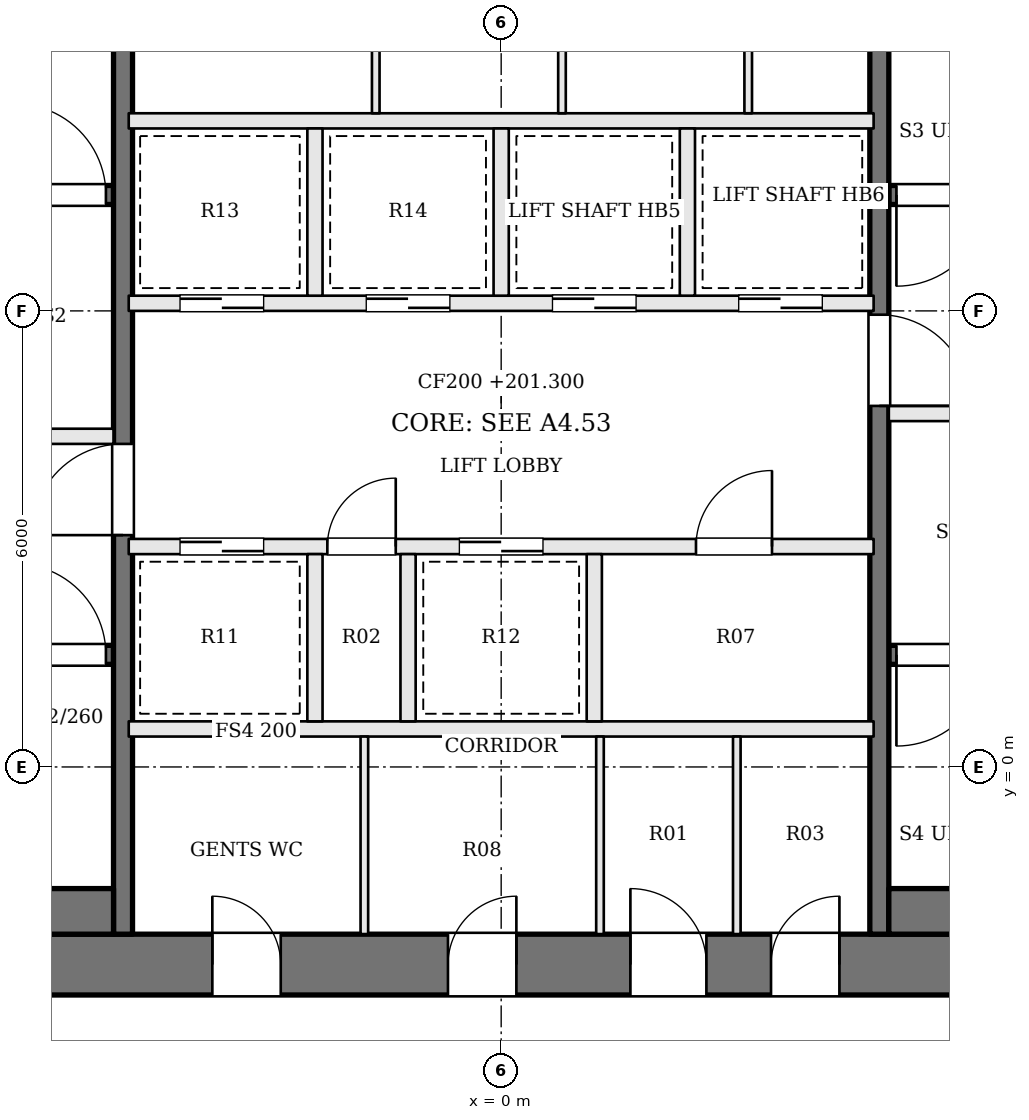
"""IFC4 building model, lengths in metres.
Left out: names, types, materials, properties, quantities, classifications, styles, units other than length and angle.
Written with IfcOpenShell. Run it as: python <this file> out.ifc"""

import sys

from ifc_helpers import new_model, si_unit, direction, frame, frame_2d, origin, place, context, subcontext, project, spatial, rectangle, extrude, element, fill, save


model = new_model("IFC4")
c1 = context("Model", 3, precision=1e-05, world=origin(), true_north=direction((0.0, 1.0)))
c2 = subcontext(c1, "Body", "Model", "MODEL_VIEW")
j1 = project(units=[si_unit("LENGTHUNIT", "METRE"), si_unit("PLANEANGLEUNIT", "RADIAN")], contexts=[c1])
p1 = place(None, origin())
s1 = spatial("IfcSite", under=j1, at=p1, CompositionType="ELEMENT")
p2 = place(p1, origin())
s2 = spatial("IfcBuilding", under=s1, at=p2, CompositionType="ELEMENT")
p3 = place(p2, frame((0.0, 0.0, 201.3)))
s3 = spatial("IfcBuildingStorey", under=s2, at=p3, CompositionType="ELEMENT", Elevation=201.3)
p4 = place(p3, frame((-13.0, -2.6, 0.0), z_axis=(0.0, 0.0, 1.0), x_axis=(1.0, 0.0, 0.0)))
e1 = element("IfcWall", 1, at=p4, inside=s3, PredefinedType="SHEAR", context=c2, shape_type="SweptSolid", body=[
    extrude(rectangle(XDim=26.0, YDim=0.8, at=frame_2d((13.0, 0.0))), origin(), (0.0, 0.0, 1.0), 3.9),
])
p5 = place(p4, frame((9.2, 0.0, 0.0)))
e2 = element("IfcOpeningElement", 2, at=p5, cuts=e1, PredefinedType="OPENING", context=c2, shape_type="SweptSolid", body=[
    extrude(rectangle(XDim=0.9, YDim=2.1, at=frame_2d((0.45, 1.05))), frame((0.0, 0.41, 0.0), z_axis=(0.0, -1.0, 0.0), x_axis=(1.0, 0.0, 0.0)), (0.0, 0.0, 1.0), 0.82),
])
p6 = place(p4, frame((12.3, 0.0, 0.0)))
e3 = element("IfcOpeningElement", 3, at=p6, cuts=e1, PredefinedType="OPENING", context=c2, shape_type="SweptSolid", body=[
    extrude(rectangle(XDim=0.9, YDim=2.1, at=frame_2d((0.45, 1.05))), frame((0.0, 0.41, 0.0), z_axis=(0.0, -1.0, 0.0), x_axis=(1.0, 0.0, 0.0)), (0.0, 0.0, 1.0), 0.82),
])
p7 = place(p4, frame((14.7, 0.0, 0.0)))
e4 = element("IfcOpeningElement", 4, at=p7, cuts=e1, PredefinedType="OPENING", context=c2, shape_type="SweptSolid", body=[
    extrude(rectangle(XDim=1.0, YDim=2.1, at=frame_2d((0.5, 1.05))), frame((0.0, 0.41, 0.0), z_axis=(0.0, -1.0, 0.0), x_axis=(1.0, 0.0, 0.0)), (0.0, 0.0, 1.0), 0.82),
])
p8 = place(p4, frame((16.55, 0.0, 0.0)))
e5 = element("IfcOpeningElement", 5, at=p8, cuts=e1, PredefinedType="OPENING", context=c2, shape_type="SweptSolid", body=[
    extrude(rectangle(XDim=0.9, YDim=2.1, at=frame_2d((0.45, 1.05))), frame((0.0, 0.41, 0.0), z_axis=(0.0, -1.0, 0.0), x_axis=(1.0, 0.0, 0.0)), (0.0, 0.0, 1.0), 0.82),
])
p9 = place(p3, frame((-12.2, 1.475, 0.0), z_axis=(0.0, 0.0, 1.0), x_axis=(1.0, 0.0, 0.0)))
e6 = element("IfcWall", 6, at=p9, inside=s3, PredefinedType="SOLIDWALL", context=c2, shape_type="SweptSolid", body=[
    extrude(rectangle(XDim=7.1, YDim=0.25, at=frame_2d((3.55, 0.0))), origin(), (0.0, 0.0, 1.0), 3.7),
])
p10 = place(p9, frame((5.8, 0.0, 0.0)))
e7 = element("IfcOpeningElement", 7, at=p10, cuts=e6, PredefinedType="OPENING", context=c2, shape_type="SweptSolid", body=[
    extrude(rectangle(XDim=1.2, YDim=2.1, at=frame_2d((0.6, 1.05))), frame((0.0, 0.135, 0.0), z_axis=(0.0, -1.0, 0.0), x_axis=(1.0, 0.0, 0.0)), (0.0, 0.0, 1.0), 0.27),
])
p11 = place(p3, frame((12.2, 7.525, 0.0), z_axis=(0.0, 0.0, 1.0), x_axis=(-1.0, 0.0, 0.0)))
e8 = element("IfcWall", 8, at=p11, inside=s3, PredefinedType="SOLIDWALL", context=c2, shape_type="SweptSolid", body=[
    extrude(rectangle(XDim=7.1, YDim=0.25, at=frame_2d((3.55, 0.0))), origin(), (0.0, 0.0, 1.0), 3.7),
])
p12 = place(p11, frame((5.8, 0.0, 0.0)))
e9 = element("IfcOpeningElement", 9, at=p12, cuts=e8, PredefinedType="OPENING", context=c2, shape_type="SweptSolid", body=[
    extrude(rectangle(XDim=1.2, YDim=2.1, at=frame_2d((0.6, 1.05))), frame((0.0, 0.135, 0.0), z_axis=(0.0, -1.0, 0.0), x_axis=(1.0, 0.0, 0.0)), (0.0, 0.0, 1.0), 0.27),
])
p13 = place(p3, frame((-12.2, 4.35, 0.0), z_axis=(0.0, 0.0, 1.0), x_axis=(1.0, 0.0, 0.0)))
e10 = element("IfcWall", 10, at=p13, inside=s3, PredefinedType="SOLIDWALL", context=c2, shape_type="SweptSolid", body=[
    extrude(rectangle(XDim=7.1, YDim=0.2, at=frame_2d((3.55, 0.0))), origin(), (0.0, 0.0, 1.0), 3.7),
])
p14 = place(p13, frame((4.4, 0.0, 0.0)))
e11 = element("IfcOpeningElement", 11, at=p14, cuts=e10, PredefinedType="OPENING", context=c2, shape_type="SweptSolid", body=[
    extrude(rectangle(XDim=1.2, YDim=2.1, at=frame_2d((0.6, 1.05))), frame((0.0, 0.11, 0.0), z_axis=(0.0, -1.0, 0.0), x_axis=(1.0, 0.0, 0.0)), (0.0, 0.0, 1.0), 0.22),
])
p15 = place(p13, frame((1.1, 0.0, 0.0)))
e12 = element("IfcOpeningElement", 12, at=p15, cuts=e10, PredefinedType="OPENING", context=c2, shape_type="SweptSolid", body=[
    extrude(rectangle(XDim=1.2, YDim=2.1, at=frame_2d((0.6, 1.05))), frame((0.0, 0.11, 0.0), z_axis=(0.0, -1.0, 0.0), x_axis=(1.0, 0.0, 0.0)), (0.0, 0.0, 1.0), 0.22),
])
p16 = place(p3, frame((12.2, 4.65, 0.0), z_axis=(0.0, 0.0, 1.0), x_axis=(-1.0, 0.0, 0.0)))
e13 = element("IfcWall", 13, at=p16, inside=s3, PredefinedType="SOLIDWALL", context=c2, shape_type="SweptSolid", body=[
    extrude(rectangle(XDim=7.1, YDim=0.2, at=frame_2d((3.55, 0.0))), origin(), (0.0, 0.0, 1.0), 3.7),
])
p17 = place(p16, frame((4.4, 0.0, 0.0)))
e14 = element("IfcOpeningElement", 14, at=p17, cuts=e13, PredefinedType="OPENING", context=c2, shape_type="SweptSolid", body=[
    extrude(rectangle(XDim=1.2, YDim=2.1, at=frame_2d((0.6, 1.05))), frame((0.0, 0.11, 0.0), z_axis=(0.0, -1.0, 0.0), x_axis=(1.0, 0.0, 0.0)), (0.0, 0.0, 1.0), 0.22),
])
p18 = place(p16, frame((1.1, 0.0, 0.0)))
e15 = element("IfcOpeningElement", 15, at=p18, cuts=e13, PredefinedType="OPENING", context=c2, shape_type="SweptSolid", body=[
    extrude(rectangle(XDim=1.2, YDim=2.1, at=frame_2d((0.6, 1.05))), frame((0.0, 0.11, 0.0), z_axis=(0.0, -1.0, 0.0), x_axis=(1.0, 0.0, 0.0)), (0.0, 0.0, 1.0), 0.22),
])
p19 = place(p3, frame((-12.2, 7.525, 0.0), z_axis=(0.0, 0.0, 1.0), x_axis=(1.0, 0.0, 0.0)))
e16 = element("IfcWall", 16, at=p19, inside=s3, PredefinedType="SOLIDWALL", context=c2, shape_type="SweptSolid", body=[
    extrude(rectangle(XDim=7.1, YDim=0.25, at=frame_2d((3.55, 0.0))), origin(), (0.0, 0.0, 1.0), 3.7),
])
p20 = place(p19, frame((5.8, 0.0, 0.0)))
e17 = element("IfcOpeningElement", 17, at=p20, cuts=e16, PredefinedType="OPENING", context=c2, shape_type="SweptSolid", body=[
    extrude(rectangle(XDim=1.2, YDim=2.1, at=frame_2d((0.6, 1.05))), frame((0.0, 0.135, 0.0), z_axis=(0.0, -1.0, 0.0), x_axis=(1.0, 0.0, 0.0)), (0.0, 0.0, 1.0), 0.27),
])
p21 = place(p3, frame((12.2, 1.475, 0.0), z_axis=(0.0, 0.0, 1.0), x_axis=(-1.0, 0.0, 0.0)))
e18 = element("IfcWall", 18, at=p21, inside=s3, PredefinedType="SOLIDWALL", context=c2, shape_type="SweptSolid", body=[
    extrude(rectangle(XDim=7.1, YDim=0.25, at=frame_2d((3.55, 0.0))), origin(), (0.0, 0.0, 1.0), 3.7),
])
p22 = place(p21, frame((5.8, 0.0, 0.0)))
e19 = element("IfcOpeningElement", 19, at=p22, cuts=e18, PredefinedType="OPENING", context=c2, shape_type="SweptSolid", body=[
    extrude(rectangle(XDim=1.2, YDim=2.1, at=frame_2d((0.6, 1.05))), frame((0.0, 0.135, 0.0), z_axis=(0.0, -1.0, 0.0), x_axis=(1.0, 0.0, 0.0)), (0.0, 0.0, 1.0), 0.27),
])
p23 = place(p3, frame((-4.975, -2.2, 0.0), z_axis=(0.0, 0.0, 1.0), x_axis=(0.0, 1.0, 0.0)))
e20 = element("IfcWall", 20, at=p23, inside=s3, PredefinedType="SOLIDWALL", context=c2, shape_type="SweptSolid", body=[
    extrude(rectangle(XDim=13.4, YDim=0.25, at=frame_2d((6.7, 0.0))), origin(), (0.0, 0.0, 1.0), 3.7),
])
p24 = place(p23, frame((5.25, 0.0, 0.0)))
e21 = element("IfcOpeningElement", 21, at=p24, cuts=e20, PredefinedType="OPENING", context=c2, shape_type="SweptSolid", body=[
    extrude(rectangle(XDim=1.2, YDim=2.1, at=frame_2d((0.6, 1.05))), frame((0.0, 0.135, 0.0), z_axis=(0.0, -1.0, 0.0), x_axis=(1.0, 0.0, 0.0)), (0.0, 0.0, 1.0), 0.27),
])
p25 = place(p3, frame((4.975, 11.2, 0.0), z_axis=(0.0, 0.0, 1.0), x_axis=(0.0, -1.0, 0.0)))
e22 = element("IfcWall", 22, at=p25, inside=s3, PredefinedType="SOLIDWALL", context=c2, shape_type="SweptSolid", body=[
    extrude(rectangle(XDim=13.4, YDim=0.25, at=frame_2d((6.7, 0.0))), origin(), (0.0, 0.0, 1.0), 3.7),
])
p26 = place(p25, frame((5.25, 0.0, 0.0)))
e23 = element("IfcOpeningElement", 23, at=p26, cuts=e22, PredefinedType="OPENING", context=c2, shape_type="SweptSolid", body=[
    extrude(rectangle(XDim=1.2, YDim=2.1, at=frame_2d((0.6, 1.05))), frame((0.0, 0.135, 0.0), z_axis=(0.0, -1.0, 0.0), x_axis=(1.0, 0.0, 0.0)), (0.0, 0.0, 1.0), 0.27),
])
for number, where, z_axis, x_axis in (
    (24, (-12.2, -1.9, 0.0), (0.0, 0.0, 1.0), (1.0, 0.0, 0.0)),
    (25, (12.2, -1.9, 0.0), (0.0, 0.0, 1.0), (-1.0, 0.0, 0.0)),
):
    element("IfcWall", number, at=place(p3, frame(where, z_axis=z_axis, x_axis=x_axis)), inside=s3, PredefinedType="SOLIDWALL", context=c2, shape_type="SweptSolid", body=[
        extrude(rectangle(XDim=7.1, YDim=0.6, at=frame_2d((3.55, 0.0))), origin(), (0.0, 0.0, 1.0), 3.7),
    ])
p27 = place(p3, frame((-4.9, 0.5, 0.0), z_axis=(0.0, 0.0, 1.0), x_axis=(1.0, 0.0, 0.0)))
e26 = element("IfcWall", 26, at=p27, inside=s3, PredefinedType="SOLIDWALL", context=c2, shape_type="SweptSolid", body=[
    extrude(rectangle(XDim=9.8, YDim=0.2, at=frame_2d((4.9, 0.0))), origin(), (0.0, 0.0, 1.0), 3.7),
])
p28 = place(p3, frame((-4.9, 2.9, 0.0), z_axis=(0.0, 0.0, 1.0), x_axis=(1.0, 0.0, 0.0)))
e27 = element("IfcWall", 27, at=p28, inside=s3, PredefinedType="SOLIDWALL", context=c2, shape_type="SweptSolid", body=[
    extrude(rectangle(XDim=9.8, YDim=0.2, at=frame_2d((4.9, 0.0))), origin(), (0.0, 0.0, 1.0), 3.7),
])
p29 = place(p28, frame((0.675, 0.0, 0.0)))
e28 = element("IfcOpeningElement", 28, at=p29, cuts=e27, PredefinedType="OPENING", context=c2, shape_type="SweptSolid", body=[
    extrude(rectangle(XDim=1.1, YDim=2.1, at=frame_2d((0.55, 1.05))), frame((0.0, 0.11, 0.0), z_axis=(0.0, -1.0, 0.0), x_axis=(1.0, 0.0, 0.0)), (0.0, 0.0, 1.0), 0.22),
])
p30 = place(p28, frame((2.613, 0.0, 0.0)))
e29 = element("IfcOpeningElement", 29, at=p30, cuts=e27, PredefinedType="OPENING", context=c2, shape_type="SweptSolid", body=[
    extrude(rectangle(XDim=0.9, YDim=2.1, at=frame_2d((0.45, 1.05))), frame((0.0, 0.11, 0.0), z_axis=(0.0, -1.0, 0.0), x_axis=(1.0, 0.0, 0.0)), (0.0, 0.0, 1.0), 0.22),
])
p31 = place(p28, frame((4.35, 0.0, 0.0)))
e30 = element("IfcOpeningElement", 30, at=p31, cuts=e27, PredefinedType="OPENING", context=c2, shape_type="SweptSolid", body=[
    extrude(rectangle(XDim=1.1, YDim=2.1, at=frame_2d((0.55, 1.05))), frame((0.0, 0.11, 0.0), z_axis=(0.0, -1.0, 0.0), x_axis=(1.0, 0.0, 0.0)), (0.0, 0.0, 1.0), 0.22),
])
p32 = place(p28, frame((7.463, 0.0, 0.0)))
e31 = element("IfcOpeningElement", 31, at=p32, cuts=e27, PredefinedType="OPENING", context=c2, shape_type="SweptSolid", body=[
    extrude(rectangle(XDim=1.0, YDim=2.1, at=frame_2d((0.5, 1.05))), frame((0.0, 0.11, 0.0), z_axis=(0.0, -1.0, 0.0), x_axis=(1.0, 0.0, 0.0)), (0.0, 0.0, 1.0), 0.22),
])
p33 = place(p3, frame((-4.9, 6.1, 0.0), z_axis=(0.0, 0.0, 1.0), x_axis=(1.0, 0.0, 0.0)))
e32 = element("IfcWall", 32, at=p33, inside=s3, PredefinedType="SOLIDWALL", context=c2, shape_type="SweptSolid", body=[
    extrude(rectangle(XDim=9.8, YDim=0.2, at=frame_2d((4.9, 0.0))), origin(), (0.0, 0.0, 1.0), 3.7),
])
p34 = place(p33, frame((0.675, 0.0, 0.0)))
e33 = element("IfcOpeningElement", 33, at=p34, cuts=e32, PredefinedType="OPENING", context=c2, shape_type="SweptSolid", body=[
    extrude(rectangle(XDim=1.1, YDim=2.1, at=frame_2d((0.55, 1.05))), frame((0.0, 0.11, 0.0), z_axis=(0.0, -1.0, 0.0), x_axis=(1.0, 0.0, 0.0)), (0.0, 0.0, 1.0), 0.22),
])
p35 = place(p33, frame((3.125, 0.0, 0.0)))
e34 = element("IfcOpeningElement", 34, at=p35, cuts=e32, PredefinedType="OPENING", context=c2, shape_type="SweptSolid", body=[
    extrude(rectangle(XDim=1.1, YDim=2.1, at=frame_2d((0.55, 1.05))), frame((0.0, 0.11, 0.0), z_axis=(0.0, -1.0, 0.0), x_axis=(1.0, 0.0, 0.0)), (0.0, 0.0, 1.0), 0.22),
])
p36 = place(p33, frame((5.575, 0.0, 0.0)))
e35 = element("IfcOpeningElement", 35, at=p36, cuts=e32, PredefinedType="OPENING", context=c2, shape_type="SweptSolid", body=[
    extrude(rectangle(XDim=1.1, YDim=2.1, at=frame_2d((0.55, 1.05))), frame((0.0, 0.11, 0.0), z_axis=(0.0, -1.0, 0.0), x_axis=(1.0, 0.0, 0.0)), (0.0, 0.0, 1.0), 0.22),
])
p37 = place(p33, frame((8.025, 0.0, 0.0)))
e36 = element("IfcOpeningElement", 36, at=p37, cuts=e32, PredefinedType="OPENING", context=c2, shape_type="SweptSolid", body=[
    extrude(rectangle(XDim=1.1, YDim=2.1, at=frame_2d((0.55, 1.05))), frame((0.0, 0.11, 0.0), z_axis=(0.0, -1.0, 0.0), x_axis=(1.0, 0.0, 0.0)), (0.0, 0.0, 1.0), 0.22),
])
p38 = place(p3, frame((-4.9, 8.5, 0.0), z_axis=(0.0, 0.0, 1.0), x_axis=(1.0, 0.0, 0.0)))
e37 = element("IfcWall", 37, at=p38, inside=s3, PredefinedType="SOLIDWALL", context=c2, shape_type="SweptSolid", body=[
    extrude(rectangle(XDim=9.8, YDim=0.2, at=frame_2d((4.9, 0.0))), origin(), (0.0, 0.0, 1.0), 3.7),
])
for number, where, z_axis, x_axis in (
    (38, (-2.45, 0.6, 0.0), (0.0, 0.0, 1.0), (0.0, 1.0, 0.0)),
    (39, (-1.225, 0.6, 0.0), (0.0, 0.0, 1.0), (0.0, 1.0, 0.0)),
    (40, (1.225, 0.6, 0.0), (0.0, 0.0, 1.0), (0.0, 1.0, 0.0)),
    (41, (-2.45, 6.2, 0.0), (0.0, 0.0, 1.0), (0.0, 1.0, 0.0)),
    (42, (0.0, 6.2, 0.0), (0.0, 0.0, 1.0), (0.0, 1.0, 0.0)),
    (43, (2.45, 6.2, 0.0), (0.0, 0.0, 1.0), (0.0, 1.0, 0.0)),
):
    element("IfcWall", number, at=place(p3, frame(where, z_axis=z_axis, x_axis=x_axis)), inside=s3, PredefinedType="SOLIDWALL", context=c2, shape_type="SweptSolid", body=[
        extrude(rectangle(XDim=2.2, YDim=0.2, at=frame_2d((1.1, 0.0))), origin(), (0.0, 0.0, 1.0), 3.7),
    ])
for number, where, z_axis, x_axis in (
    (44, (-1.8, -2.2, 0.0), (0.0, 0.0, 1.0), (0.0, 1.0, 0.0)),
    (45, (1.3, -2.2, 0.0), (0.0, 0.0, 1.0), (0.0, 1.0, 0.0)),
    (46, (3.1, -2.2, 0.0), (0.0, 0.0, 1.0), (0.0, 1.0, 0.0)),
    (47, (-1.65, 8.6, 0.0), (0.0, 0.0, 1.0), (0.0, 1.0, 0.0)),
    (48, (0.8, 8.6, 0.0), (0.0, 0.0, 1.0), (0.0, 1.0, 0.0)),
    (49, (3.25, 8.6, 0.0), (0.0, 0.0, 1.0), (0.0, 1.0, 0.0)),
):
    element("IfcWall", number, at=place(p3, frame(where, z_axis=z_axis, x_axis=x_axis)), inside=s3, PredefinedType="PARTITIONING", context=c2, shape_type="SweptSolid", body=[
        extrude(rectangle(XDim=2.6, YDim=0.1, at=frame_2d((1.3, 0.0))), origin(), (0.0, 0.0, 1.0), 3.7),
    ])
p39 = place(p24, origin())
e50 = element("IfcDoor", 50, at=p39, inside=s3, OperationType="SINGLE_SWING_LEFT", PredefinedType="DOOR", context=c2, shape_type="SweptSolid", body=[
    extrude(rectangle(XDim=1.2, YDim=2.1, at=frame_2d((0.6, 1.05))), frame((0.0, 0.025, 0.0), z_axis=(0.0, -1.0, 0.0), x_axis=(1.0, 0.0, 0.0)), (0.0, 0.0, 1.0), 0.05),
])
fill(e21, e50)
p40 = place(p26, origin())
e51 = element("IfcDoor", 51, at=p40, inside=s3, OperationType="SINGLE_SWING_RIGHT", PredefinedType="DOOR", context=c2, shape_type="SweptSolid", body=[
    extrude(rectangle(XDim=1.2, YDim=2.1, at=frame_2d((0.6, 1.05))), frame((0.0, 0.025, 0.0), z_axis=(0.0, -1.0, 0.0), x_axis=(1.0, 0.0, 0.0)), (0.0, 0.0, 1.0), 0.05),
])
fill(e23, e51)
p41 = place(p10, origin())
e52 = element("IfcDoor", 52, at=p41, inside=s3, OperationType="SINGLE_SWING_LEFT", PredefinedType="DOOR", context=c2, shape_type="SweptSolid", body=[
    extrude(rectangle(XDim=1.2, YDim=2.1, at=frame_2d((0.6, 1.05))), frame((0.0, 0.025, 0.0), z_axis=(0.0, -1.0, 0.0), x_axis=(1.0, 0.0, 0.0)), (0.0, 0.0, 1.0), 0.05),
])
fill(e7, e52)
p42 = place(p12, origin())
e53 = element("IfcDoor", 53, at=p42, inside=s3, OperationType="SINGLE_SWING_RIGHT", PredefinedType="DOOR", context=c2, shape_type="SweptSolid", body=[
    extrude(rectangle(XDim=1.2, YDim=2.1, at=frame_2d((0.6, 1.05))), frame((0.0, 0.025, 0.0), z_axis=(0.0, -1.0, 0.0), x_axis=(1.0, 0.0, 0.0)), (0.0, 0.0, 1.0), 0.05),
])
fill(e9, e53)
p43 = place(p20, origin())
e54 = element("IfcDoor", 54, at=p43, inside=s3, OperationType="SINGLE_SWING_LEFT", PredefinedType="DOOR", context=c2, shape_type="SweptSolid", body=[
    extrude(rectangle(XDim=1.2, YDim=2.1, at=frame_2d((0.6, 1.05))), frame((0.0, 0.025, 0.0), z_axis=(0.0, -1.0, 0.0), x_axis=(1.0, 0.0, 0.0)), (0.0, 0.0, 1.0), 0.05),
])
fill(e17, e54)
p44 = place(p22, origin())
e55 = element("IfcDoor", 55, at=p44, inside=s3, OperationType="SINGLE_SWING_RIGHT", PredefinedType="DOOR", context=c2, shape_type="SweptSolid", body=[
    extrude(rectangle(XDim=1.2, YDim=2.1, at=frame_2d((0.6, 1.05))), frame((0.0, 0.025, 0.0), z_axis=(0.0, -1.0, 0.0), x_axis=(1.0, 0.0, 0.0)), (0.0, 0.0, 1.0), 0.05),
])
fill(e19, e55)
p45 = place(p29, origin())
e56 = element("IfcDoor", 56, at=p45, inside=s3, OperationType="SLIDING_TO_RIGHT", PredefinedType="DOOR", context=c2, shape_type="SweptSolid", body=[
    extrude(rectangle(XDim=1.1, YDim=2.1, at=frame_2d((0.55, 1.05))), frame((0.0, 0.025, 0.0), z_axis=(0.0, -1.0, 0.0), x_axis=(1.0, 0.0, 0.0)), (0.0, 0.0, 1.0), 0.05),
])
fill(e28, e56)
p46 = place(p30, origin())
e57 = element("IfcDoor", 57, at=p46, inside=s3, OperationType="SINGLE_SWING_RIGHT", PredefinedType="DOOR", context=c2, shape_type="SweptSolid", body=[
    extrude(rectangle(XDim=0.9, YDim=2.1, at=frame_2d((0.45, 1.05))), frame((0.0, 0.025, 0.0), z_axis=(0.0, -1.0, 0.0), x_axis=(1.0, 0.0, 0.0)), (0.0, 0.0, 1.0), 0.05),
])
fill(e29, e57)
p47 = place(p31, origin())
e58 = element("IfcDoor", 58, at=p47, inside=s3, OperationType="SLIDING_TO_LEFT", PredefinedType="DOOR", context=c2, shape_type="SweptSolid", body=[
    extrude(rectangle(XDim=1.1, YDim=2.1, at=frame_2d((0.55, 1.05))), frame((0.0, 0.025, 0.0), z_axis=(0.0, -1.0, 0.0), x_axis=(1.0, 0.0, 0.0)), (0.0, 0.0, 1.0), 0.05),
])
fill(e30, e58)
p48 = place(p32, origin())
e59 = element("IfcDoor", 59, at=p48, inside=s3, OperationType="SINGLE_SWING_RIGHT", PredefinedType="DOOR", context=c2, shape_type="SweptSolid", body=[
    extrude(rectangle(XDim=1.0, YDim=2.1, at=frame_2d((0.5, 1.05))), frame((0.0, 0.025, 0.0), z_axis=(0.0, -1.0, 0.0), x_axis=(1.0, 0.0, 0.0)), (0.0, 0.0, 1.0), 0.05),
])
fill(e31, e59)
p49 = place(p34, origin())
e60 = element("IfcDoor", 60, at=p49, inside=s3, OperationType="SLIDING_TO_RIGHT", PredefinedType="DOOR", context=c2, shape_type="SweptSolid", body=[
    extrude(rectangle(XDim=1.1, YDim=2.1, at=frame_2d((0.55, 1.05))), frame((0.0, 0.025, 0.0), z_axis=(0.0, -1.0, 0.0), x_axis=(1.0, 0.0, 0.0)), (0.0, 0.0, 1.0), 0.05),
])
fill(e33, e60)
p50 = place(p35, origin())
e61 = element("IfcDoor", 61, at=p50, inside=s3, OperationType="SLIDING_TO_LEFT", PredefinedType="DOOR", context=c2, shape_type="SweptSolid", body=[
    extrude(rectangle(XDim=1.1, YDim=2.1, at=frame_2d((0.55, 1.05))), frame((0.0, 0.025, 0.0), z_axis=(0.0, -1.0, 0.0), x_axis=(1.0, 0.0, 0.0)), (0.0, 0.0, 1.0), 0.05),
])
fill(e34, e61)
p51 = place(p36, origin())
e62 = element("IfcDoor", 62, at=p51, inside=s3, OperationType="SLIDING_TO_RIGHT", PredefinedType="DOOR", context=c2, shape_type="SweptSolid", body=[
    extrude(rectangle(XDim=1.1, YDim=2.1, at=frame_2d((0.55, 1.05))), frame((0.0, 0.025, 0.0), z_axis=(0.0, -1.0, 0.0), x_axis=(1.0, 0.0, 0.0)), (0.0, 0.0, 1.0), 0.05),
])
fill(e35, e62)
p52 = place(p37, origin())
e63 = element("IfcDoor", 63, at=p52, inside=s3, OperationType="SLIDING_TO_LEFT", PredefinedType="DOOR", context=c2, shape_type="SweptSolid", body=[
    extrude(rectangle(XDim=1.1, YDim=2.1, at=frame_2d((0.55, 1.05))), frame((0.0, 0.025, 0.0), z_axis=(0.0, -1.0, 0.0), x_axis=(1.0, 0.0, 0.0)), (0.0, 0.0, 1.0), 0.05),
])
fill(e36, e63)
p53 = place(p5, origin())
e64 = element("IfcDoor", 64, at=p53, inside=s3, OperationType="SINGLE_SWING_LEFT", PredefinedType="DOOR", context=c2, shape_type="SweptSolid", body=[
    extrude(rectangle(XDim=0.9, YDim=2.1, at=frame_2d((0.45, 1.05))), frame((0.0, 0.025, 0.0), z_axis=(0.0, -1.0, 0.0), x_axis=(1.0, 0.0, 0.0)), (0.0, 0.0, 1.0), 0.05),
])
fill(e2, e64)
p54 = place(p6, origin())
e65 = element("IfcDoor", 65, at=p54, inside=s3, OperationType="SINGLE_SWING_RIGHT", PredefinedType="DOOR", context=c2, shape_type="SweptSolid", body=[
    extrude(rectangle(XDim=0.9, YDim=2.1, at=frame_2d((0.45, 1.05))), frame((0.0, 0.025, 0.0), z_axis=(0.0, -1.0, 0.0), x_axis=(1.0, 0.0, 0.0)), (0.0, 0.0, 1.0), 0.05),
])
fill(e3, e65)
p55 = place(p7, origin())
e66 = element("IfcDoor", 66, at=p55, inside=s3, OperationType="SINGLE_SWING_LEFT", PredefinedType="DOOR", context=c2, shape_type="SweptSolid", body=[
    extrude(rectangle(XDim=1.0, YDim=2.1, at=frame_2d((0.5, 1.05))), frame((0.0, 0.025, 0.0), z_axis=(0.0, -1.0, 0.0), x_axis=(1.0, 0.0, 0.0)), (0.0, 0.0, 1.0), 0.05),
])
fill(e4, e66)
p56 = place(p8, origin())
e67 = element("IfcDoor", 67, at=p56, inside=s3, OperationType="SINGLE_SWING_RIGHT", PredefinedType="DOOR", context=c2, shape_type="SweptSolid", body=[
    extrude(rectangle(XDim=0.9, YDim=2.1, at=frame_2d((0.45, 1.05))), frame((0.0, 0.025, 0.0), z_axis=(0.0, -1.0, 0.0), x_axis=(1.0, 0.0, 0.0)), (0.0, 0.0, 1.0), 0.05),
])
fill(e5, e67)
save(model, sys.argv[1])
